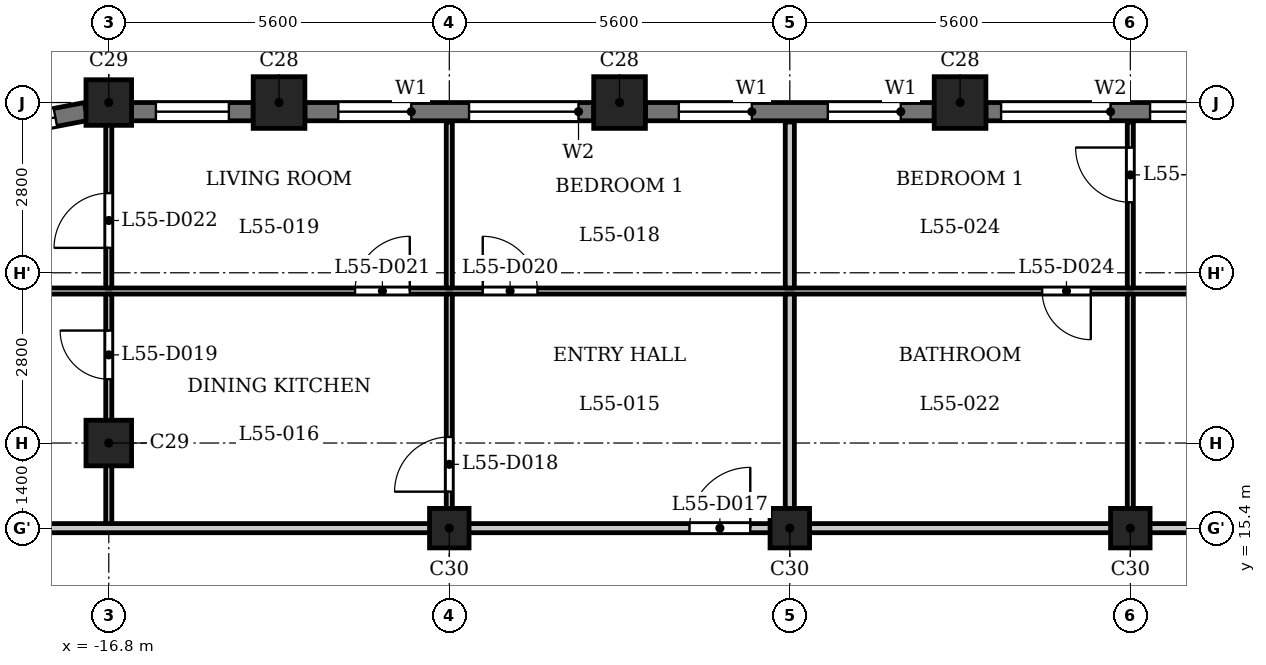
"""IFC4 building model, lengths in metres.
Left out: names, types, materials, properties, quantities, classifications, styles, units other than length and angle.
Written with IfcOpenShell. Run it as: python <this file> out.ifc"""

import sys

from ifc_helpers import new_model, si_unit, direction, frame, frame_2d, origin, origin_2d, place, context, subcontext, project, spatial, rectangle, extrude, element, fill, save


model = new_model("IFC4")
c1 = context("Model", 3, precision=1e-05, world=origin(), true_north=direction((0.0, 1.0)))
c2 = subcontext(c1, "Body", "Model", "MODEL_VIEW")
j1 = project(units=[si_unit("LENGTHUNIT", "METRE"), si_unit("PLANEANGLEUNIT", "RADIAN")], contexts=[c1])
p1 = place(None, origin())
s1 = spatial("IfcSite", under=j1, at=p1, CompositionType="ELEMENT")
p2 = place(p1, origin())
s2 = spatial("IfcBuilding", under=s1, at=p2, CompositionType="ELEMENT")
p3 = place(p2, frame((0.0, 0.0, 213.4)))
s3 = spatial("IfcBuildingStorey", under=s2, at=p3, CompositionType="ELEMENT", Elevation=213.4)
for number, where, z_axis, x_axis in (
    (1, (-2.8, 22.4, 0.0), (0.0, 0.0, 1.0), (1.0, 0.0, 0.0)),
    (2, (-8.4, 22.4, 0.0), (0.0, 0.0, 1.0), (1.0, 0.0, 0.0)),
    (3, (-14.0, 22.4, 0.0), (0.0, 0.0, 1.0), (1.0, 0.0, 0.0)),
):
    element("IfcColumn", number, at=place(p3, frame(where, z_axis=z_axis, x_axis=x_axis)), inside=s3, PredefinedType="COLUMN", context=c2, shape_type="SweptSolid", body=[
        extrude(rectangle(XDim=0.85, YDim=0.85, at=origin_2d()), origin(), (0.0, 0.0, 1.0), 3.5),
    ])
for number, where, z_axis, x_axis in (
    (4, (-16.8, 16.8, 0.0), (0.0, 0.0, 1.0), (1.0, 0.0, 0.0)),
    (5, (-16.8, 22.4, 0.0), (0.0, 0.0, 1.0), (1.0, 0.0, 0.0)),
):
    element("IfcColumn", number, at=place(p3, frame(where, z_axis=z_axis, x_axis=x_axis)), inside=s3, PredefinedType="COLUMN", context=c2, shape_type="SweptSolid", body=[
        extrude(rectangle(XDim=0.75, YDim=0.75, at=origin_2d()), origin(), (0.0, 0.0, 1.0), 3.5),
    ])
for number, where, z_axis, x_axis in (
    (6, (-11.2, 15.4, 0.0), (0.0, 0.0, 1.0), (1.0, 0.0, 0.0)),
    (7, (-5.6, 15.4, 0.0), (0.0, 0.0, 1.0), (1.0, 0.0, 0.0)),
    (8, (0.0, 15.4, 0.0), (0.0, 0.0, 1.0), (1.0, 0.0, 0.0)),
):
    element("IfcColumn", number, at=place(p3, frame(where, z_axis=z_axis, x_axis=x_axis)), inside=s3, PredefinedType="COLUMN", context=c2, shape_type="SweptSolid", body=[
        extrude(rectangle(XDim=0.65, YDim=0.65, at=origin_2d()), origin(), (0.0, 0.0, 1.0), 3.5),
    ])
p4 = place(p3, frame((2.375, 22.25, 0.0), z_axis=(0.0, 0.0, 1.0), x_axis=(-1.0, 0.0, 0.0)))
e9 = element("IfcWall", 9, at=p4, inside=s3, PredefinedType="SOLIDWALL", context=c2, shape_type="SweptSolid", body=[
    extrude(rectangle(XDim=4.75, YDim=0.3, at=frame_2d((2.375, 0.0))), origin(), (0.0, 0.0, 1.0), 2.5),
])
p5 = place(p4, frame((0.25, 0.0, 0.9)))
e10 = element("IfcOpeningElement", 10, at=p5, cuts=e9, PredefinedType="OPENING", context=c2, shape_type="SweptSolid", body=[
    extrude(rectangle(XDim=1.8, YDim=1.25, at=frame_2d((0.9, 0.625))), frame((0.0, 0.16, 0.0), z_axis=(0.0, -1.0, 0.0), x_axis=(1.0, 0.0, 0.0)), (0.0, 0.0, 1.0), 0.32),
])
p6 = place(p4, frame((2.7, 0.0, 0.9)))
e11 = element("IfcOpeningElement", 11, at=p6, cuts=e9, PredefinedType="OPENING", context=c2, shape_type="SweptSolid", body=[
    extrude(rectangle(XDim=1.8, YDim=1.25, at=frame_2d((0.9, 0.625))), frame((0.0, 0.16, 0.0), z_axis=(0.0, -1.0, 0.0), x_axis=(1.0, 0.0, 0.0)), (0.0, 0.0, 1.0), 0.32),
])
p7 = place(p3, frame((-3.225, 22.25, 0.0), z_axis=(0.0, 0.0, 1.0), x_axis=(-1.0, 0.0, 0.0)))
e12 = element("IfcWall", 12, at=p7, inside=s3, PredefinedType="SOLIDWALL", context=c2, shape_type="SweptSolid", body=[
    extrude(rectangle(XDim=4.75, YDim=0.3, at=frame_2d((2.375, 0.0))), origin(), (0.0, 0.0, 1.0), 2.5),
])
p8 = place(p7, frame((0.55, 0.0, 0.6)))
e13 = element("IfcOpeningElement", 13, at=p8, cuts=e12, PredefinedType="OPENING", context=c2, shape_type="SweptSolid", body=[
    extrude(rectangle(XDim=1.2, YDim=1.55, at=frame_2d((0.6, 0.775))), frame((0.0, 0.16, 0.0), z_axis=(0.0, -1.0, 0.0), x_axis=(1.0, 0.0, 0.0)), (0.0, 0.0, 1.0), 0.32),
])
p9 = place(p7, frame((3.0, 0.0, 0.6)))
e14 = element("IfcOpeningElement", 14, at=p9, cuts=e12, PredefinedType="OPENING", context=c2, shape_type="SweptSolid", body=[
    extrude(rectangle(XDim=1.2, YDim=1.55, at=frame_2d((0.6, 0.775))), frame((0.0, 0.16, 0.0), z_axis=(0.0, -1.0, 0.0), x_axis=(1.0, 0.0, 0.0)), (0.0, 0.0, 1.0), 0.32),
])
p10 = place(p3, frame((-8.825, 22.25, 0.0), z_axis=(0.0, 0.0, 1.0), x_axis=(-1.0, 0.0, 0.0)))
e15 = element("IfcWall", 15, at=p10, inside=s3, PredefinedType="SOLIDWALL", context=c2, shape_type="SweptSolid", body=[
    extrude(rectangle(XDim=4.75, YDim=0.3, at=frame_2d((2.375, 0.0))), origin(), (0.0, 0.0, 1.0), 2.5),
])
p11 = place(p10, frame((0.25, 0.0, 0.9)))
e16 = element("IfcOpeningElement", 16, at=p11, cuts=e15, PredefinedType="OPENING", context=c2, shape_type="SweptSolid", body=[
    extrude(rectangle(XDim=1.8, YDim=1.25, at=frame_2d((0.9, 0.625))), frame((0.0, 0.16, 0.0), z_axis=(0.0, -1.0, 0.0), x_axis=(1.0, 0.0, 0.0)), (0.0, 0.0, 1.0), 0.32),
])
p12 = place(p10, frame((3.0, 0.0, 0.6)))
e17 = element("IfcOpeningElement", 17, at=p12, cuts=e15, PredefinedType="OPENING", context=c2, shape_type="SweptSolid", body=[
    extrude(rectangle(XDim=1.2, YDim=1.55, at=frame_2d((0.6, 0.775))), frame((0.0, 0.16, 0.0), z_axis=(0.0, -1.0, 0.0), x_axis=(1.0, 0.0, 0.0)), (0.0, 0.0, 1.0), 0.32),
])
p13 = place(p3, frame((-14.425, 22.25, 0.0), z_axis=(0.0, 0.0, 1.0), x_axis=(-1.0, 0.0, 0.0)))
e18 = element("IfcWall", 18, at=p13, inside=s3, PredefinedType="SOLIDWALL", context=c2, shape_type="SweptSolid", body=[
    extrude(rectangle(XDim=2.0, YDim=0.3, at=frame_2d((1.0, 0.0))), origin(), (0.0, 0.0, 1.0), 2.5),
])
p14 = place(p13, frame((0.4, 0.0, 0.6)))
e19 = element("IfcOpeningElement", 19, at=p14, cuts=e18, PredefinedType="OPENING", context=c2, shape_type="SweptSolid", body=[
    extrude(rectangle(XDim=1.2, YDim=1.55, at=frame_2d((0.6, 0.775))), frame((0.0, 0.16, 0.0), z_axis=(0.0, -1.0, 0.0), x_axis=(1.0, 0.0, 0.0)), (0.0, 0.0, 1.0), 0.32),
])
p15 = place(p3, frame((-17.172, 22.253, 0.0), z_axis=(0.0, 0.0, 1.0), x_axis=(-0.982300037503, -0.187314271538, 0.0)))
e20 = element("IfcWall", 20, at=p15, inside=s3, PredefinedType="SOLIDWALL", context=c2, shape_type="SweptSolid", body=[
    extrude(rectangle(XDim=1.831, YDim=0.3, at=frame_2d((0.916, 0.0))), origin(), (0.0, 0.0, 1.0), 2.5),
])
p16 = place(p15, frame((0.516, 0.0, 0.6)))
e21 = element("IfcOpeningElement", 21, at=p16, cuts=e20, PredefinedType="OPENING", context=c2, shape_type="SweptSolid", body=[
    extrude(rectangle(XDim=0.8, YDim=1.55, at=frame_2d((0.4, 0.775))), frame((0.0, 0.16, 0.0), z_axis=(0.0, -1.0, 0.0), x_axis=(1.0, 0.0, 0.0)), (0.0, 0.0, 1.0), 0.32),
])
p17 = place(p3, frame((-24.684, 15.4, 0.0), z_axis=(0.0, 0.0, 1.0), x_axis=(1.0, 0.0, 0.0)))
e22 = element("IfcWall", 22, at=p17, inside=s3, PredefinedType="PARTITIONING", context=c2, shape_type="SweptSolid", body=[
    extrude(rectangle(XDim=49.368, YDim=0.15, at=frame_2d((24.684, 0.0))), origin(), (0.0, 0.0, 1.0), 3.2),
])
p18 = place(p17, frame((17.434, 0.0, 0.0)))
e23 = element("IfcOpeningElement", 23, at=p18, cuts=e22, PredefinedType="OPENING", context=c2, shape_type="SweptSolid", body=[
    extrude(rectangle(XDim=1.0, YDim=2.1, at=frame_2d((0.5, 1.05))), frame((0.0, 0.085, 0.0), z_axis=(0.0, -1.0, 0.0), x_axis=(1.0, 0.0, 0.0)), (0.0, 0.0, 1.0), 0.17),
])
p19 = place(p17, frame((28.634, 0.0, 0.0)))
e24 = element("IfcOpeningElement", 24, at=p19, cuts=e22, PredefinedType="OPENING", context=c2, shape_type="SweptSolid", body=[
    extrude(rectangle(XDim=1.0, YDim=2.1, at=frame_2d((0.5, 1.05))), frame((0.0, 0.085, 0.0), z_axis=(0.0, -1.0, 0.0), x_axis=(1.0, 0.0, 0.0)), (0.0, 0.0, 1.0), 0.17),
])
p20 = place(p17, frame((47.225, 0.0, 0.0)))
e25 = element("IfcOpeningElement", 25, at=p20, cuts=e22, PredefinedType="OPENING", context=c2, shape_type="SweptSolid", body=[
    extrude(rectangle(XDim=1.0, YDim=2.1, at=frame_2d((0.5, 1.05))), frame((0.0, 0.085, 0.0), z_axis=(0.0, -1.0, 0.0), x_axis=(1.0, 0.0, 0.0)), (0.0, 0.0, 1.0), 0.17),
])
p21 = place(p3, frame((-22.256, 19.3, 0.0), z_axis=(0.0, 0.0, 1.0), x_axis=(1.0, 0.0, 0.0)))
e26 = element("IfcWall", 26, at=p21, inside=s3, PredefinedType="PARTITIONING", context=c2, shape_type="SweptSolid", body=[
    extrude(rectangle(XDim=44.511, YDim=0.1, at=frame_2d((22.256, 0.0))), origin(), (0.0, 0.0, 1.0), 3.2),
])
p22 = place(p21, frame((11.606, 0.0, 0.0)))
e27 = element("IfcOpeningElement", 27, at=p22, cuts=e26, PredefinedType="OPENING", context=c2, shape_type="SweptSolid", body=[
    extrude(rectangle(XDim=0.9, YDim=2.1, at=frame_2d((0.45, 1.05))), frame((0.0, 0.06, 0.0), z_axis=(0.0, -1.0, 0.0), x_axis=(1.0, 0.0, 0.0)), (0.0, 0.0, 1.0), 0.12),
])
p23 = place(p21, frame((9.506, 0.0, 0.0)))
e28 = element("IfcOpeningElement", 28, at=p23, cuts=e26, PredefinedType="OPENING", context=c2, shape_type="SweptSolid", body=[
    extrude(rectangle(XDim=0.9, YDim=2.1, at=frame_2d((0.45, 1.05))), frame((0.0, 0.06, 0.0), z_axis=(0.0, -1.0, 0.0), x_axis=(1.0, 0.0, 0.0)), (0.0, 0.0, 1.0), 0.12),
])
p24 = place(p21, frame((20.806, 0.0, 0.0)))
e29 = element("IfcOpeningElement", 29, at=p24, cuts=e26, PredefinedType="OPENING", context=c2, shape_type="SweptSolid", body=[
    extrude(rectangle(XDim=0.8, YDim=2.1, at=frame_2d((0.4, 1.05))), frame((0.0, 0.06, 0.0), z_axis=(0.0, -1.0, 0.0), x_axis=(1.0, 0.0, 0.0)), (0.0, 0.0, 1.0), 0.12),
])
p25 = place(p21, frame((26.306, 0.0, 0.0)))
e30 = element("IfcOpeningElement", 30, at=p25, cuts=e26, PredefinedType="OPENING", context=c2, shape_type="SweptSolid", body=[
    extrude(rectangle(XDim=0.9, YDim=2.1, at=frame_2d((0.45, 1.05))), frame((0.0, 0.06, 0.0), z_axis=(0.0, -1.0, 0.0), x_axis=(1.0, 0.0, 0.0)), (0.0, 0.0, 1.0), 0.12),
])
p26 = place(p21, frame((40.278, 0.0, 0.0)))
e31 = element("IfcOpeningElement", 31, at=p26, cuts=e26, PredefinedType="OPENING", context=c2, shape_type="SweptSolid", body=[
    extrude(rectangle(XDim=0.9, YDim=2.1, at=frame_2d((0.45, 1.05))), frame((0.0, 0.06, 0.0), z_axis=(0.0, -1.0, 0.0), x_axis=(1.0, 0.0, 0.0)), (0.0, 0.0, 1.0), 0.12),
])
p27 = place(p21, frame((36.756, 0.0, 0.0)))
e32 = element("IfcOpeningElement", 32, at=p27, cuts=e26, PredefinedType="OPENING", context=c2, shape_type="SweptSolid", body=[
    extrude(rectangle(XDim=0.9, YDim=2.1, at=frame_2d((0.45, 1.05))), frame((0.0, 0.06, 0.0), z_axis=(0.0, -1.0, 0.0), x_axis=(1.0, 0.0, 0.0)), (0.0, 0.0, 1.0), 0.12),
])
p28 = place(p3, frame((-16.8, 15.475, 0.0), z_axis=(0.0, 0.0, 1.0), x_axis=(0.0, 1.0, 0.0)))
e33 = element("IfcWall", 33, at=p28, inside=s3, PredefinedType="PARTITIONING", context=c2, shape_type="SweptSolid", body=[
    extrude(rectangle(XDim=3.775, YDim=0.1, at=frame_2d((1.887, 0.0))), origin(), (0.0, 0.0, 1.0), 2.55),
])
p29 = place(p28, frame((2.375, 0.0, 0.0)))
e34 = element("IfcOpeningElement", 34, at=p29, cuts=e33, PredefinedType="OPENING", context=c2, shape_type="SweptSolid", body=[
    extrude(rectangle(XDim=0.8, YDim=2.1, at=frame_2d((0.4, 1.05))), frame((0.0, 0.06, 0.0), z_axis=(0.0, -1.0, 0.0), x_axis=(1.0, 0.0, 0.0)), (0.0, 0.0, 1.0), 0.12),
])
p30 = place(p3, frame((-16.8, 19.35, 0.0), z_axis=(0.0, 0.0, 1.0), x_axis=(0.0, 1.0, 0.0)))
e35 = element("IfcWall", 35, at=p30, inside=s3, PredefinedType="PARTITIONING", context=c2, shape_type="SweptSolid", body=[
    extrude(rectangle(XDim=2.96, YDim=0.1, at=frame_2d((1.48, 0.0))), origin(), (0.0, 0.0, 1.0), 2.55),
])
p31 = place(p30, frame((0.66, 0.0, 0.0)))
e36 = element("IfcOpeningElement", 36, at=p31, cuts=e35, PredefinedType="OPENING", context=c2, shape_type="SweptSolid", body=[
    extrude(rectangle(XDim=0.9, YDim=2.1, at=frame_2d((0.45, 1.05))), frame((0.0, 0.06, 0.0), z_axis=(0.0, -1.0, 0.0), x_axis=(1.0, 0.0, 0.0)), (0.0, 0.0, 1.0), 0.12),
])
p32 = place(p3, frame((-11.2, 15.475, 0.0), z_axis=(0.0, 0.0, 1.0), x_axis=(0.0, 1.0, 0.0)))
e37 = element("IfcWall", 37, at=p32, inside=s3, PredefinedType="PARTITIONING", context=c2, shape_type="SweptSolid", body=[
    extrude(rectangle(XDim=3.775, YDim=0.1, at=frame_2d((1.887, 0.0))), origin(), (0.0, 0.0, 1.0), 3.2),
])
p33 = place(p32, frame((0.525, 0.0, 0.0)))
e38 = element("IfcOpeningElement", 38, at=p33, cuts=e37, PredefinedType="OPENING", context=c2, shape_type="SweptSolid", body=[
    extrude(rectangle(XDim=0.9, YDim=2.1, at=frame_2d((0.45, 1.05))), frame((0.0, 0.06, 0.0), z_axis=(0.0, -1.0, 0.0), x_axis=(1.0, 0.0, 0.0)), (0.0, 0.0, 1.0), 0.12),
])
p34 = place(p3, frame((-11.2, 19.35, 0.0), z_axis=(0.0, 0.0, 1.0), x_axis=(0.0, 1.0, 0.0)))
e39 = element("IfcWall", 39, at=p34, inside=s3, PredefinedType="PARTITIONING", context=c2, shape_type="SweptSolid", body=[
    extrude(rectangle(XDim=2.73, YDim=0.1, at=frame_2d((1.365, 0.0))), origin(), (0.0, 0.0, 1.0), 3.2),
])
p35 = place(p3, frame((-5.6, 15.475, 0.0), z_axis=(0.0, 0.0, 1.0), x_axis=(0.0, 1.0, 0.0)))
e40 = element("IfcWall", 40, at=p35, inside=s3, PredefinedType="PARTITIONING", context=c2, shape_type="SweptSolid", body=[
    extrude(rectangle(XDim=3.775, YDim=0.15, at=frame_2d((1.887, 0.0))), origin(), (0.0, 0.0, 1.0), 3.2),
])
p36 = place(p3, frame((-5.6, 19.35, 0.0), z_axis=(0.0, 0.0, 1.0), x_axis=(0.0, 1.0, 0.0)))
e41 = element("IfcWall", 41, at=p36, inside=s3, PredefinedType="PARTITIONING", context=c2, shape_type="SweptSolid", body=[
    extrude(rectangle(XDim=2.73, YDim=0.15, at=frame_2d((1.365, 0.0))), origin(), (0.0, 0.0, 1.0), 3.2),
])
p37 = place(p3, frame((0.0, 15.475, 0.0), z_axis=(0.0, 0.0, 1.0), x_axis=(0.0, 1.0, 0.0)))
e42 = element("IfcWall", 42, at=p37, inside=s3, PredefinedType="PARTITIONING", context=c2, shape_type="SweptSolid", body=[
    extrude(rectangle(XDim=3.775, YDim=0.1, at=frame_2d((1.887, 0.0))), origin(), (0.0, 0.0, 1.0), 3.2),
])
p38 = place(p3, frame((0.0, 19.35, 0.0), z_axis=(0.0, 0.0, 1.0), x_axis=(0.0, 1.0, 0.0)))
e43 = element("IfcWall", 43, at=p38, inside=s3, PredefinedType="PARTITIONING", context=c2, shape_type="SweptSolid", body=[
    extrude(rectangle(XDim=2.73, YDim=0.1, at=frame_2d((1.365, 0.0))), origin(), (0.0, 0.0, 1.0), 3.2),
])
p39 = place(p38, frame((1.41, 0.0, 0.0)))
e44 = element("IfcOpeningElement", 44, at=p39, cuts=e43, PredefinedType="OPENING", context=c2, shape_type="SweptSolid", body=[
    extrude(rectangle(XDim=0.9, YDim=2.1, at=frame_2d((0.45, 1.05))), frame((0.0, 0.06, 0.0), z_axis=(0.0, -1.0, 0.0), x_axis=(1.0, 0.0, 0.0)), (0.0, 0.0, 1.0), 0.12),
])
p40 = place(p18, origin())
e45 = element("IfcDoor", 45, at=p40, inside=s3, OperationType="SINGLE_SWING_LEFT", PredefinedType="DOOR", context=c2, shape_type="SweptSolid", body=[
    extrude(rectangle(XDim=1.0, YDim=2.1, at=frame_2d((0.5, 1.05))), frame((0.0, 0.025, 0.0), z_axis=(0.0, -1.0, 0.0), x_axis=(1.0, 0.0, 0.0)), (0.0, 0.0, 1.0), 0.05),
])
fill(e23, e45)
p41 = place(p33, origin())
e46 = element("IfcDoor", 46, at=p41, inside=s3, OperationType="SINGLE_SWING_RIGHT", PredefinedType="DOOR", context=c2, shape_type="SweptSolid", body=[
    extrude(rectangle(XDim=0.9, YDim=2.1, at=frame_2d((0.45, 1.05))), frame((0.0, 0.025, 0.0), z_axis=(0.0, -1.0, 0.0), x_axis=(1.0, 0.0, 0.0)), (0.0, 0.0, 1.0), 0.05),
])
fill(e38, e46)
p42 = place(p29, origin())
e47 = element("IfcDoor", 47, at=p42, inside=s3, OperationType="SINGLE_SWING_LEFT", PredefinedType="DOOR", context=c2, shape_type="SweptSolid", body=[
    extrude(rectangle(XDim=0.8, YDim=2.1, at=frame_2d((0.4, 1.05))), frame((0.0, 0.025, 0.0), z_axis=(0.0, -1.0, 0.0), x_axis=(1.0, 0.0, 0.0)), (0.0, 0.0, 1.0), 0.05),
])
fill(e34, e47)
p43 = place(p22, origin())
e48 = element("IfcDoor", 48, at=p43, inside=s3, OperationType="SINGLE_SWING_RIGHT", PredefinedType="DOOR", context=c2, shape_type="SweptSolid", body=[
    extrude(rectangle(XDim=0.9, YDim=2.1, at=frame_2d((0.45, 1.05))), frame((0.0, 0.025, 0.0), z_axis=(0.0, -1.0, 0.0), x_axis=(1.0, 0.0, 0.0)), (0.0, 0.0, 1.0), 0.05),
])
fill(e27, e48)
p44 = place(p23, origin())
e49 = element("IfcDoor", 49, at=p44, inside=s3, OperationType="SINGLE_SWING_LEFT", PredefinedType="DOOR", context=c2, shape_type="SweptSolid", body=[
    extrude(rectangle(XDim=0.9, YDim=2.1, at=frame_2d((0.45, 1.05))), frame((0.0, 0.025, 0.0), z_axis=(0.0, -1.0, 0.0), x_axis=(1.0, 0.0, 0.0)), (0.0, 0.0, 1.0), 0.05),
])
fill(e28, e49)
p45 = place(p31, origin())
e50 = element("IfcDoor", 50, at=p45, inside=s3, OperationType="SINGLE_SWING_RIGHT", PredefinedType="DOOR", context=c2, shape_type="SweptSolid", body=[
    extrude(rectangle(XDim=0.9, YDim=2.1, at=frame_2d((0.45, 1.05))), frame((0.0, 0.025, 0.0), z_axis=(0.0, -1.0, 0.0), x_axis=(1.0, 0.0, 0.0)), (0.0, 0.0, 1.0), 0.05),
])
fill(e36, e50)
p46 = place(p24, origin())
e51 = element("IfcDoor", 51, at=p46, inside=s3, OperationType="SINGLE_SWING_RIGHT", PredefinedType="DOOR", context=c2, shape_type="SweptSolid", body=[
    extrude(rectangle(XDim=0.8, YDim=2.1, at=frame_2d((0.4, 1.05))), frame((0.0, 0.025, 0.0), z_axis=(0.0, -1.0, 0.0), x_axis=(1.0, 0.0, 0.0)), (0.0, 0.0, 1.0), 0.05),
])
fill(e29, e51)
p47 = place(p39, origin())
e52 = element("IfcDoor", 52, at=p47, inside=s3, OperationType="SINGLE_SWING_LEFT", PredefinedType="DOOR", context=c2, shape_type="SweptSolid", body=[
    extrude(rectangle(XDim=0.9, YDim=2.1, at=frame_2d((0.45, 1.05))), frame((0.0, 0.025, 0.0), z_axis=(0.0, -1.0, 0.0), x_axis=(1.0, 0.0, 0.0)), (0.0, 0.0, 1.0), 0.05),
])
fill(e44, e52)
p48 = place(p5, origin())
e53 = element("IfcWindow", 53, at=p48, inside=s3, PartitioningType="SINGLE_PANEL", PredefinedType="WINDOW", context=c2, shape_type="SweptSolid", body=[
    extrude(rectangle(XDim=1.8, YDim=1.25, at=frame_2d((0.9, 0.625))), frame((0.0, 0.03, 0.0), z_axis=(0.0, -1.0, 0.0), x_axis=(1.0, 0.0, 0.0)), (0.0, 0.0, 1.0), 0.06),
])
fill(e10, e53)
p49 = place(p6, origin())
e54 = element("IfcWindow", 54, at=p49, inside=s3, PartitioningType="SINGLE_PANEL", PredefinedType="WINDOW", context=c2, shape_type="SweptSolid", body=[
    extrude(rectangle(XDim=1.8, YDim=1.25, at=frame_2d((0.9, 0.625))), frame((0.0, 0.03, 0.0), z_axis=(0.0, -1.0, 0.0), x_axis=(1.0, 0.0, 0.0)), (0.0, 0.0, 1.0), 0.06),
])
fill(e11, e54)
p50 = place(p8, origin())
e55 = element("IfcWindow", 55, at=p50, inside=s3, PartitioningType="SINGLE_PANEL", PredefinedType="WINDOW", context=c2, shape_type="SweptSolid", body=[
    extrude(rectangle(XDim=1.2, YDim=1.55, at=frame_2d((0.6, 0.775))), frame((0.0, 0.03, 0.0), z_axis=(0.0, -1.0, 0.0), x_axis=(1.0, 0.0, 0.0)), (0.0, 0.0, 1.0), 0.06),
])
fill(e13, e55)
p51 = place(p9, origin())
e56 = element("IfcWindow", 56, at=p51, inside=s3, PartitioningType="SINGLE_PANEL", PredefinedType="WINDOW", context=c2, shape_type="SweptSolid", body=[
    extrude(rectangle(XDim=1.2, YDim=1.55, at=frame_2d((0.6, 0.775))), frame((0.0, 0.03, 0.0), z_axis=(0.0, -1.0, 0.0), x_axis=(1.0, 0.0, 0.0)), (0.0, 0.0, 1.0), 0.06),
])
fill(e14, e56)
p52 = place(p11, origin())
e57 = element("IfcWindow", 57, at=p52, inside=s3, PartitioningType="SINGLE_PANEL", PredefinedType="WINDOW", context=c2, shape_type="SweptSolid", body=[
    extrude(rectangle(XDim=1.8, YDim=1.25, at=frame_2d((0.9, 0.625))), frame((0.0, 0.03, 0.0), z_axis=(0.0, -1.0, 0.0), x_axis=(1.0, 0.0, 0.0)), (0.0, 0.0, 1.0), 0.06),
])
fill(e16, e57)
p53 = place(p12, origin())
e58 = element("IfcWindow", 58, at=p53, inside=s3, PartitioningType="SINGLE_PANEL", PredefinedType="WINDOW", context=c2, shape_type="SweptSolid", body=[
    extrude(rectangle(XDim=1.2, YDim=1.55, at=frame_2d((0.6, 0.775))), frame((0.0, 0.03, 0.0), z_axis=(0.0, -1.0, 0.0), x_axis=(1.0, 0.0, 0.0)), (0.0, 0.0, 1.0), 0.06),
])
fill(e17, e58)
p54 = place(p14, origin())
e59 = element("IfcWindow", 59, at=p54, inside=s3, PartitioningType="SINGLE_PANEL", PredefinedType="WINDOW", context=c2, shape_type="SweptSolid", body=[
    extrude(rectangle(XDim=1.2, YDim=1.55, at=frame_2d((0.6, 0.775))), frame((0.0, 0.03, 0.0), z_axis=(0.0, -1.0, 0.0), x_axis=(1.0, 0.0, 0.0)), (0.0, 0.0, 1.0), 0.06),
])
fill(e19, e59)
p55 = place(p16, origin())
e60 = element("IfcWindow", 60, at=p55, inside=s3, PartitioningType="SINGLE_PANEL", PredefinedType="WINDOW", context=c2, shape_type="SweptSolid", body=[
    extrude(rectangle(XDim=0.8, YDim=1.55, at=frame_2d((0.4, 0.775))), frame((0.0, 0.03, 0.0), z_axis=(0.0, -1.0, 0.0), x_axis=(1.0, 0.0, 0.0)), (0.0, 0.0, 1.0), 0.06),
])
fill(e21, e60)
save(model, sys.argv[1])
